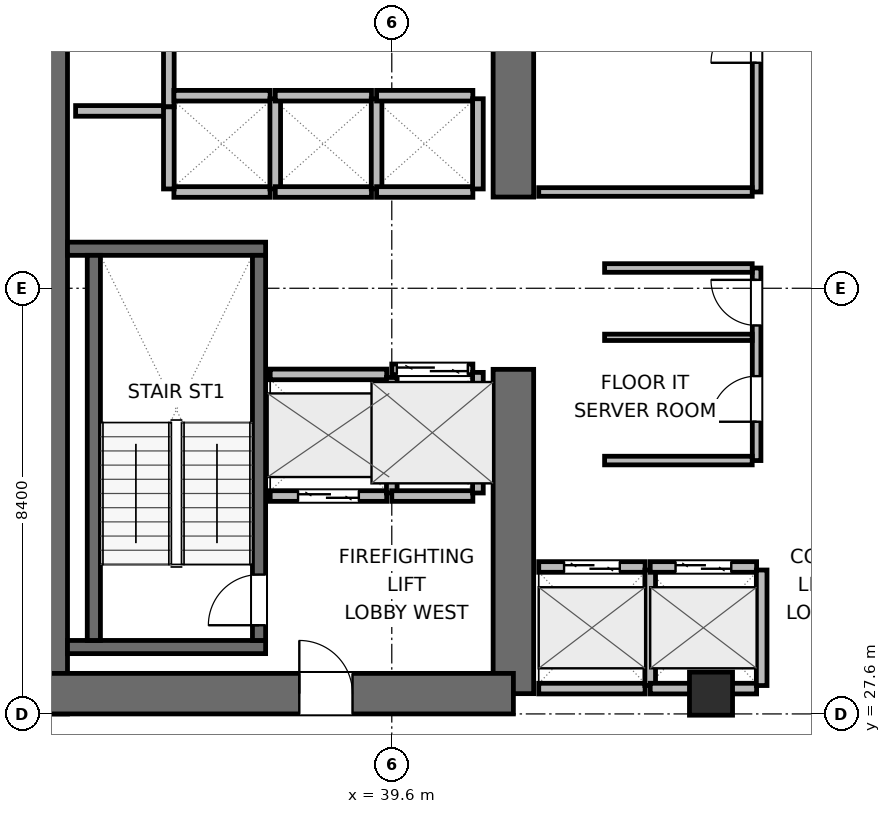
"""IFC4 building model, lengths in metres.
Left out: names, types, materials, properties, quantities, classifications, styles, units other than length and angle.
Written with IfcOpenShell. Run it as: python <this file> out.ifc"""

import sys

from ifc_helpers import new_model, si_unit, direction, frame, frame_2d, origin, origin_2d, place, context, subcontext, project, spatial, rectangle, extrude, element, fill, save


model = new_model("IFC4")
c1 = context("Model", 3, precision=1e-05, world=origin(), true_north=direction((0.0, 1.0)))
c2 = subcontext(c1, "Body", "Model", "MODEL_VIEW")
j1 = project(units=[si_unit("LENGTHUNIT", "METRE"), si_unit("PLANEANGLEUNIT", "RADIAN")], contexts=[c1])
p1 = place(None, origin())
s1 = spatial("IfcSite", under=j1, at=p1, CompositionType="ELEMENT")
p2 = place(p1, origin())
s2 = spatial("IfcBuilding", under=s1, at=p2, CompositionType="ELEMENT")
p3 = place(p2, frame((0.0, 0.0, 109.2)))
s3 = spatial("IfcBuildingStorey", under=s2, at=p3, CompositionType="ELEMENT", Elevation=109.2)
p4 = place(p3, frame((32.8, 27.6, 0.0), z_axis=(0.0, 0.0, 1.0), x_axis=(0.0, 1.0, 0.0)))
e1 = element("IfcWall", 1, at=p4, inside=s3, PredefinedType="SHEAR", context=c2, shape_type="SweptSolid", body=[
    extrude(rectangle(XDim=16.8, YDim=0.8, at=frame_2d((8.4, 0.0))), origin(), (0.0, 0.0, 1.0), 3.9),
])
p5 = place(p3, frame((42.0, 28.0, 0.0), z_axis=(0.0, 0.0, 1.0), x_axis=(0.0, 1.0, 0.0)))
e2 = element("IfcWall", 2, at=p5, inside=s3, PredefinedType="SHEAR", context=c2, shape_type="SweptSolid", body=[
    extrude(rectangle(XDim=6.4, YDim=0.8, at=frame_2d((3.2, 0.0))), origin(), (0.0, 0.0, 1.0), 3.9),
])
p6 = place(p3, frame((42.0, 37.8, 0.0), z_axis=(0.0, 0.0, 1.0), x_axis=(0.0, 1.0, 0.0)))
e3 = element("IfcWall", 3, at=p6, inside=s3, PredefinedType="SHEAR", context=c2, shape_type="SweptSolid", body=[
    extrude(rectangle(XDim=6.2, YDim=0.8, at=frame_2d((3.1, 0.0))), origin(), (0.0, 0.0, 1.0), 3.9),
])
p7 = place(p3, frame((32.8, 28.0, 0.0), z_axis=(0.0, 0.0, 1.0), x_axis=(1.0, 0.0, 0.0)))
e4 = element("IfcWall", 4, at=p7, inside=s3, PredefinedType="SHEAR", context=c2, shape_type="SweptSolid", body=[
    extrude(rectangle(XDim=9.2, YDim=0.8, at=frame_2d((4.6, 0.0))), origin(), (0.0, 0.0, 1.0), 3.9),
])
p8 = place(p7, frame((4.975, 0.0, 0.0)))
e5 = element("IfcOpeningElement", 5, at=p8, cuts=e4, PredefinedType="OPENING", context=c2, shape_type="SweptSolid", body=[
    extrude(rectangle(XDim=1.05, YDim=2.04, at=frame_2d((0.525, 1.02))), frame((0.0, 0.41, 0.0), z_axis=(0.0, -1.0, 0.0), x_axis=(1.0, 0.0, 0.0)), (0.0, 0.0, 1.0), 0.82),
])
for number, where, z_axis, x_axis in (
    (6, (33.2, 28.92, 0.0), (0.0, 0.0, 1.0), (1.0, 0.0, 0.0)),
    (7, (33.2, 36.78, 0.0), (0.0, 0.0, 1.0), (1.0, 0.0, 0.0)),
):
    element("IfcWall", number, at=place(p3, frame(where, z_axis=z_axis, x_axis=x_axis)), inside=s3, PredefinedType="SHEAR", context=c2, shape_type="SweptSolid", body=[
        extrude(rectangle(XDim=3.91, YDim=0.26, at=frame_2d((1.955, 0.0))), origin(), (0.0, 0.0, 1.0), 3.9),
    ])
p9 = place(p3, frame((33.72, 29.05, 0.0), z_axis=(0.0, 0.0, 1.0), x_axis=(0.0, 1.0, 0.0)))
e8 = element("IfcWall", 8, at=p9, inside=s3, PredefinedType="SHEAR", context=c2, shape_type="SweptSolid", body=[
    extrude(rectangle(XDim=7.6, YDim=0.26, at=frame_2d((3.8, 0.0))), origin(), (0.0, 0.0, 1.0), 3.9),
])
p10 = place(p3, frame((36.98, 29.05, 0.0), z_axis=(0.0, 0.0, 1.0), x_axis=(0.0, 1.0, 0.0)))
e9 = element("IfcWall", 9, at=p10, inside=s3, PredefinedType="SHEAR", context=c2, shape_type="SweptSolid", body=[
    extrude(rectangle(XDim=7.6, YDim=0.26, at=frame_2d((3.8, 0.0))), origin(), (0.0, 0.0, 1.0), 3.9),
])
p11 = place(p10, frame((0.3, 0.0, 0.0)))
e10 = element("IfcOpeningElement", 10, at=p11, cuts=e9, PredefinedType="OPENING", context=c2, shape_type="SweptSolid", body=[
    extrude(rectangle(XDim=1.0, YDim=2.04, at=frame_2d((0.5, 1.02))), frame((0.0, 0.14, 0.0), z_axis=(0.0, -1.0, 0.0), x_axis=(1.0, 0.0, 0.0)), (0.0, 0.0, 1.0), 0.28),
])
p12 = place(p3, frame((45.9, 28.0, 0.0), z_axis=(0.0, 0.0, 1.0), x_axis=(1.0, 0.0, 0.0)))
e11 = element("IfcColumn", 11, at=p12, inside=s3, PredefinedType="COLUMN", context=c2, shape_type="SweptSolid", body=[
    extrude(rectangle(XDim=0.85, YDim=0.85, at=origin_2d()), origin(), (0.0, 0.0, 1.0), 3.9),
])
p13 = place(p3, frame((33.36, 39.5, 0.0), z_axis=(0.0, 0.0, 1.0), x_axis=(1.0, 0.0, 0.0)))
e12 = element("IfcWall", 12, at=p13, inside=s3, PredefinedType="PARTITIONING", context=c2, shape_type="SweptSolid", body=[
    extrude(rectangle(XDim=1.86, YDim=0.21, at=frame_2d((0.93, 0.0))), origin(), (0.0, 0.0, 1.0), 3.64),
])
p14 = place(p3, frame((35.2, 39.58, 0.0), z_axis=(0.0, 0.0, 1.0), x_axis=(0.0, 1.0, 0.0)))
e13 = element("IfcWall", 13, at=p14, inside=s3, PredefinedType="PARTITIONING", context=c2, shape_type="SweptSolid", body=[
    extrude(rectangle(XDim=1.32, YDim=0.21, at=frame_2d((0.66, 0.0))), origin(), (0.0, 0.0, 1.0), 3.64),
])
p15 = place(p3, frame((37.2, 31.9, 0.0), z_axis=(0.0, 0.0, 1.0), x_axis=(1.0, 0.0, 0.0)))
e14 = element("IfcWall", 14, at=p15, inside=s3, PredefinedType="PARTITIONING", context=c2, shape_type="SweptSolid", body=[
    extrude(rectangle(XDim=2.3, YDim=0.21, at=frame_2d((1.15, 0.0))), origin(), (0.0, 0.0, 1.0), 3.64),
])
p16 = place(p15, frame((0.55, 0.0, 0.0)))
e15 = element("IfcOpeningElement", 15, at=p16, cuts=e14, PredefinedType="OPENING", context=c2, shape_type="SweptSolid", body=[
    extrude(rectangle(XDim=1.2, YDim=2.04, at=frame_2d((0.6, 1.02))), frame((0.0, 0.115, 0.0), z_axis=(0.0, -1.0, 0.0), x_axis=(1.0, 0.0, 0.0)), (0.0, 0.0, 1.0), 0.23),
])
p17 = place(p3, frame((37.2, 34.3, 0.0), z_axis=(0.0, 0.0, 1.0), x_axis=(1.0, 0.0, 0.0)))
e16 = element("IfcWall", 16, at=p17, inside=s3, PredefinedType="PARTITIONING", context=c2, shape_type="SweptSolid", body=[
    extrude(rectangle(XDim=2.3, YDim=0.21, at=frame_2d((1.15, 0.0))), origin(), (0.0, 0.0, 1.0), 3.64),
])
p18 = place(p3, frame((39.6, 31.96, 0.0), z_axis=(0.0, 0.0, 1.0), x_axis=(0.0, 1.0, 0.0)))
e17 = element("IfcWall", 17, at=p18, inside=s3, PredefinedType="PARTITIONING", context=c2, shape_type="SweptSolid", body=[
    extrude(rectangle(XDim=2.28, YDim=0.21, at=frame_2d((1.14, 0.0))), origin(), (0.0, 0.0, 1.0), 3.64),
])
p19 = place(p3, frame((39.6, 34.4, 0.0), z_axis=(0.0, 0.0, 1.0), x_axis=(1.0, 0.0, 0.0)))
e18 = element("IfcWall", 18, at=p19, inside=s3, PredefinedType="PARTITIONING", context=c2, shape_type="SweptSolid", body=[
    extrude(rectangle(XDim=1.6, YDim=0.21, at=frame_2d((0.8, 0.0))), origin(), (0.0, 0.0, 1.0), 3.64),
])
p20 = place(p19, frame((0.1, 0.0, 0.0)))
e19 = element("IfcOpeningElement", 19, at=p20, cuts=e18, PredefinedType="OPENING", context=c2, shape_type="SweptSolid", body=[
    extrude(rectangle(XDim=1.4, YDim=2.06, at=frame_2d((0.7, 1.03))), frame((0.0, 0.115, 0.0), z_axis=(0.0, -1.0, 0.0), x_axis=(1.0, 0.0, 0.0)), (0.0, 0.0, 1.0), 0.23),
])
p21 = place(p3, frame((39.6, 31.9, 0.0), z_axis=(0.0, 0.0, 1.0), x_axis=(1.0, 0.0, 0.0)))
e20 = element("IfcWall", 20, at=p21, inside=s3, PredefinedType="PARTITIONING", context=c2, shape_type="SweptSolid", body=[
    extrude(rectangle(XDim=1.6, YDim=0.21, at=frame_2d((0.8, 0.0))), origin(), (0.0, 0.0, 1.0), 3.64),
])
p22 = place(p3, frame((41.3, 31.96, 0.0), z_axis=(0.0, 0.0, 1.0), x_axis=(0.0, 1.0, 0.0)))
e21 = element("IfcWall", 21, at=p22, inside=s3, PredefinedType="PARTITIONING", context=c2, shape_type="SweptSolid", body=[
    extrude(rectangle(XDim=2.38, YDim=0.21, at=frame_2d((1.19, 0.0))), origin(), (0.0, 0.0, 1.0), 3.64),
])
p23 = place(p3, frame((42.5, 30.5, 0.0), z_axis=(0.0, 0.0, 1.0), x_axis=(1.0, 0.0, 0.0)))
e22 = element("IfcWall", 22, at=p23, inside=s3, PredefinedType="PARTITIONING", context=c2, shape_type="SweptSolid", body=[
    extrude(rectangle(XDim=2.1, YDim=0.21, at=frame_2d((1.05, 0.0))), origin(), (0.0, 0.0, 1.0), 3.64),
])
p24 = place(p23, frame((0.5, 0.0, 0.0)))
e23 = element("IfcOpeningElement", 23, at=p24, cuts=e22, PredefinedType="OPENING", context=c2, shape_type="SweptSolid", body=[
    extrude(rectangle(XDim=1.1, YDim=2.04, at=frame_2d((0.55, 1.02))), frame((0.0, 0.115, 0.0), z_axis=(0.0, -1.0, 0.0), x_axis=(1.0, 0.0, 0.0)), (0.0, 0.0, 1.0), 0.23),
])
p25 = place(p3, frame((42.5, 28.1, 0.0), z_axis=(0.0, 0.0, 1.0), x_axis=(1.0, 0.0, 0.0)))
e24 = element("IfcWall", 24, at=p25, inside=s3, PredefinedType="PARTITIONING", context=c2, shape_type="SweptSolid", body=[
    extrude(rectangle(XDim=2.1, YDim=0.21, at=frame_2d((1.05, 0.0))), origin(), (0.0, 0.0, 1.0), 2.525),
])
p26 = place(p3, frame((44.7, 28.16, 0.0), z_axis=(0.0, 0.0, 1.0), x_axis=(0.0, 1.0, 0.0)))
e25 = element("IfcWall", 25, at=p26, inside=s3, PredefinedType="PARTITIONING", context=c2, shape_type="SweptSolid", body=[
    extrude(rectangle(XDim=2.28, YDim=0.21, at=frame_2d((1.14, 0.0))), origin(), (0.0, 0.0, 1.0), 3.64),
])
p27 = place(p3, frame((44.7, 30.5, 0.0), z_axis=(0.0, 0.0, 1.0), x_axis=(1.0, 0.0, 0.0)))
e26 = element("IfcWall", 26, at=p27, inside=s3, PredefinedType="PARTITIONING", context=c2, shape_type="SweptSolid", body=[
    extrude(rectangle(XDim=2.1, YDim=0.21, at=frame_2d((1.05, 0.0))), origin(), (0.0, 0.0, 1.0), 3.64),
])
p28 = place(p27, frame((0.5, 0.0, 0.0)))
e27 = element("IfcOpeningElement", 27, at=p28, cuts=e26, PredefinedType="OPENING", context=c2, shape_type="SweptSolid", body=[
    extrude(rectangle(XDim=1.1, YDim=2.04, at=frame_2d((0.55, 1.02))), frame((0.0, 0.115, 0.0), z_axis=(0.0, -1.0, 0.0), x_axis=(1.0, 0.0, 0.0)), (0.0, 0.0, 1.0), 0.23),
])
p29 = place(p3, frame((44.7, 28.1, 0.0), z_axis=(0.0, 0.0, 1.0), x_axis=(1.0, 0.0, 0.0)))
e28 = element("IfcWall", 28, at=p29, inside=s3, PredefinedType="PARTITIONING", context=c2, shape_type="SweptSolid", body=[
    extrude(rectangle(XDim=2.1, YDim=0.21, at=frame_2d((1.05, 0.0))), origin(), (0.0, 0.0, 1.0), 2.525),
])
p30 = place(p3, frame((46.9, 28.16, 0.0), z_axis=(0.0, 0.0, 1.0), x_axis=(0.0, 1.0, 0.0)))
e29 = element("IfcWall", 29, at=p30, inside=s3, PredefinedType="PARTITIONING", context=c2, shape_type="SweptSolid", body=[
    extrude(rectangle(XDim=2.28, YDim=0.21, at=frame_2d((1.14, 0.0))), origin(), (0.0, 0.0, 1.0), 3.64),
])
for number, where, z_axis, x_axis in (
    (30, (35.3, 37.9, 0.0), (0.0, 0.0, 1.0), (1.0, 0.0, 0.0)),
    (31, (35.3, 39.8, 0.0), (0.0, 0.0, 1.0), (1.0, 0.0, 0.0)),
):
    element("IfcWall", number, at=place(p3, frame(where, z_axis=z_axis, x_axis=x_axis)), inside=s3, PredefinedType="PARTITIONING", context=c2, shape_type="SweptSolid", body=[
        extrude(rectangle(XDim=1.9, YDim=0.21, at=frame_2d((0.95, 0.0))), origin(), (0.0, 0.0, 1.0), 3.64),
    ])
p31 = place(p3, frame((35.2, 37.96, 0.0), z_axis=(0.0, 0.0, 1.0), x_axis=(0.0, 1.0, 0.0)))
e32 = element("IfcWall", 32, at=p31, inside=s3, PredefinedType="PARTITIONING", context=c2, shape_type="SweptSolid", body=[
    extrude(rectangle(XDim=1.62, YDim=0.21, at=frame_2d((0.81, 0.0))), origin(), (0.0, 0.0, 1.0), 3.64),
])
p32 = place(p3, frame((37.3, 37.96, 0.0), z_axis=(0.0, 0.0, 1.0), x_axis=(0.0, 1.0, 0.0)))
e33 = element("IfcWall", 33, at=p32, inside=s3, PredefinedType="PARTITIONING", context=c2, shape_type="SweptSolid", body=[
    extrude(rectangle(XDim=1.78, YDim=0.21, at=frame_2d((0.89, 0.0))), origin(), (0.0, 0.0, 1.0), 3.64),
])
for number, where, z_axis, x_axis in (
    (34, (37.3, 37.9, 0.0), (0.0, 0.0, 1.0), (1.0, 0.0, 0.0)),
    (35, (37.3, 39.8, 0.0), (0.0, 0.0, 1.0), (1.0, 0.0, 0.0)),
):
    element("IfcWall", number, at=place(p3, frame(where, z_axis=z_axis, x_axis=x_axis)), inside=s3, PredefinedType="PARTITIONING", context=c2, shape_type="SweptSolid", body=[
        extrude(rectangle(XDim=1.9, YDim=0.21, at=frame_2d((0.95, 0.0))), origin(), (0.0, 0.0, 1.0), 3.64),
    ])
p33 = place(p3, frame((39.3, 37.96, 0.0), z_axis=(0.0, 0.0, 1.0), x_axis=(0.0, 1.0, 0.0)))
e36 = element("IfcWall", 36, at=p33, inside=s3, PredefinedType="PARTITIONING", context=c2, shape_type="SweptSolid", body=[
    extrude(rectangle(XDim=1.78, YDim=0.21, at=frame_2d((0.89, 0.0))), origin(), (0.0, 0.0, 1.0), 3.64),
])
for number, where, z_axis, x_axis in (
    (37, (39.3, 37.9, 0.0), (0.0, 0.0, 1.0), (1.0, 0.0, 0.0)),
    (38, (39.3, 39.8, 0.0), (0.0, 0.0, 1.0), (1.0, 0.0, 0.0)),
):
    element("IfcWall", number, at=place(p3, frame(where, z_axis=z_axis, x_axis=x_axis)), inside=s3, PredefinedType="PARTITIONING", context=c2, shape_type="SweptSolid", body=[
        extrude(rectangle(XDim=1.9, YDim=0.21, at=frame_2d((0.95, 0.0))), origin(), (0.0, 0.0, 1.0), 3.64),
    ])
p34 = place(p3, frame((41.3, 37.96, 0.0), z_axis=(0.0, 0.0, 1.0), x_axis=(0.0, 1.0, 0.0)))
e39 = element("IfcWall", 39, at=p34, inside=s3, PredefinedType="PARTITIONING", context=c2, shape_type="SweptSolid", body=[
    extrude(rectangle(XDim=1.78, YDim=0.21, at=frame_2d((0.89, 0.0))), origin(), (0.0, 0.0, 1.0), 3.64),
])
p35 = place(p3, frame((46.8, 32.6, 0.0), z_axis=(0.0, 0.0, 1.0), x_axis=(0.0, 1.0, 0.0)))
e40 = element("IfcWall", 40, at=p35, inside=s3, PredefinedType="PARTITIONING", context=c2, shape_type="SweptSolid", body=[
    extrude(rectangle(XDim=3.8, YDim=0.17, at=frame_2d((1.9, 0.0))), origin(), (0.0, 0.0, 1.0), 3.64),
])
p36 = place(p35, frame((0.766, 0.0, 0.0)))
e41 = element("IfcOpeningElement", 41, at=p36, cuts=e40, PredefinedType="OPENING", context=c2, shape_type="SweptSolid", body=[
    extrude(rectangle(XDim=0.9, YDim=2.02, at=frame_2d((0.45, 1.01))), frame((0.0, 0.095, 0.0), z_axis=(0.0, -1.0, 0.0), x_axis=(1.0, 0.0, 0.0)), (0.0, 0.0, 1.0), 0.19),
])
p37 = place(p35, frame((2.666, 0.0, 0.0)))
e42 = element("IfcOpeningElement", 42, at=p37, cuts=e40, PredefinedType="OPENING", context=c2, shape_type="SweptSolid", body=[
    extrude(rectangle(XDim=0.9, YDim=2.02, at=frame_2d((0.45, 1.01))), frame((0.0, 0.095, 0.0), z_axis=(0.0, -1.0, 0.0), x_axis=(1.0, 0.0, 0.0)), (0.0, 0.0, 1.0), 0.19),
])
for number, where, z_axis, x_axis in (
    (43, (43.8, 32.6, 0.0), (0.0, 0.0, 1.0), (1.0, 0.0, 0.0)),
    (44, (43.8, 36.4, 0.0), (0.0, 0.0, 1.0), (1.0, 0.0, 0.0)),
):
    element("IfcWall", number, at=place(p3, frame(where, z_axis=z_axis, x_axis=x_axis)), inside=s3, PredefinedType="PARTITIONING", context=c2, shape_type="SweptSolid", body=[
        extrude(rectangle(XDim=2.913, YDim=0.17, at=frame_2d((1.457, 0.0))), origin(), (0.0, 0.0, 1.0), 3.64),
    ])
p38 = place(p3, frame((43.8, 35.032, 0.0), z_axis=(0.0, 0.0, 1.0), x_axis=(1.0, 0.0, 0.0)))
e45 = element("IfcWall", 45, at=p38, inside=s3, PredefinedType="PARTITIONING", context=c2, shape_type="SweptSolid", body=[
    extrude(rectangle(XDim=2.913, YDim=0.125, at=frame_2d((1.457, 0.0))), origin(), (0.0, 0.0, 1.0), 3.64),
])
p39 = place(p3, frame((46.8, 37.9, 0.0), z_axis=(0.0, 0.0, 1.0), x_axis=(0.0, 1.0, 0.0)))
e46 = element("IfcWall", 46, at=p39, inside=s3, PredefinedType="PARTITIONING", context=c2, shape_type="SweptSolid", body=[
    extrude(rectangle(XDim=6.0, YDim=0.17, at=frame_2d((3.0, 0.0))), origin(), (0.0, 0.0, 1.0), 3.64),
])
p40 = place(p39, frame((2.55, 0.0, 0.0)))
e47 = element("IfcOpeningElement", 47, at=p40, cuts=e46, PredefinedType="OPENING", context=c2, shape_type="SweptSolid", body=[
    extrude(rectangle(XDim=0.9, YDim=2.02, at=frame_2d((0.45, 1.01))), frame((0.0, 0.095, 0.0), z_axis=(0.0, -1.0, 0.0), x_axis=(1.0, 0.0, 0.0)), (0.0, 0.0, 1.0), 0.19),
])
p41 = place(p3, frame((42.5, 37.9, 0.0), z_axis=(0.0, 0.0, 1.0), x_axis=(1.0, 0.0, 0.0)))
e48 = element("IfcWall", 48, at=p41, inside=s3, PredefinedType="PARTITIONING", context=c2, shape_type="SweptSolid", body=[
    extrude(rectangle(XDim=4.213, YDim=0.17, at=frame_2d((2.106, 0.0))), origin(), (0.0, 0.0, 1.0), 3.64),
])
p42 = place(p11, origin())
e49 = element("IfcDoor", 49, at=p42, inside=s3, OperationType="SINGLE_SWING_LEFT", PredefinedType="DOOR", context=c2, shape_type="SweptSolid", body=[
    extrude(rectangle(XDim=1.0, YDim=2.04, at=frame_2d((0.5, 1.02))), frame((0.0, 0.025, 0.0), z_axis=(0.0, -1.0, 0.0), x_axis=(1.0, 0.0, 0.0)), (0.0, 0.0, 1.0), 0.05),
])
fill(e10, e49)
p43 = place(p16, origin())
e50 = element("IfcDoor", 50, at=p43, inside=s3, OperationType="DOUBLE_DOOR_SLIDING", PredefinedType="DOOR", context=c2, shape_type="SweptSolid", body=[
    extrude(rectangle(XDim=1.2, YDim=2.04, at=frame_2d((0.6, 1.02))), frame((0.0, 0.025, 0.0), z_axis=(0.0, -1.0, 0.0), x_axis=(1.0, 0.0, 0.0)), (0.0, 0.0, 1.0), 0.05),
])
fill(e15, e50)
p44 = place(p20, origin())
e51 = element("IfcDoor", 51, at=p44, inside=s3, OperationType="DOUBLE_DOOR_SLIDING", PredefinedType="DOOR", context=c2, shape_type="SweptSolid", body=[
    extrude(rectangle(XDim=1.4, YDim=2.06, at=frame_2d((0.7, 1.03))), frame((0.0, 0.025, 0.0), z_axis=(0.0, -1.0, 0.0), x_axis=(1.0, 0.0, 0.0)), (0.0, 0.0, 1.0), 0.05),
])
fill(e19, e51)
p45 = place(p24, origin())
e52 = element("IfcDoor", 52, at=p45, inside=s3, OperationType="DOUBLE_DOOR_SLIDING", PredefinedType="DOOR", context=c2, shape_type="SweptSolid", body=[
    extrude(rectangle(XDim=1.1, YDim=2.04, at=frame_2d((0.55, 1.02))), frame((0.0, 0.025, 0.0), z_axis=(0.0, -1.0, 0.0), x_axis=(1.0, 0.0, 0.0)), (0.0, 0.0, 1.0), 0.05),
])
fill(e23, e52)
p46 = place(p28, origin())
e53 = element("IfcDoor", 53, at=p46, inside=s3, OperationType="DOUBLE_DOOR_SLIDING", PredefinedType="DOOR", context=c2, shape_type="SweptSolid", body=[
    extrude(rectangle(XDim=1.1, YDim=2.04, at=frame_2d((0.55, 1.02))), frame((0.0, 0.025, 0.0), z_axis=(0.0, -1.0, 0.0), x_axis=(1.0, 0.0, 0.0)), (0.0, 0.0, 1.0), 0.05),
])
fill(e27, e53)
p47 = place(p8, origin())
e54 = element("IfcDoor", 54, at=p47, inside=s3, OperationType="SINGLE_SWING_LEFT", PredefinedType="DOOR", context=c2, shape_type="SweptSolid", body=[
    extrude(rectangle(XDim=1.05, YDim=2.04, at=frame_2d((0.525, 1.02))), frame((0.0, 0.025, 0.0), z_axis=(0.0, -1.0, 0.0), x_axis=(1.0, 0.0, 0.0)), (0.0, 0.0, 1.0), 0.05),
])
fill(e5, e54)
p48 = place(p36, origin())
e55 = element("IfcDoor", 55, at=p48, inside=s3, OperationType="SINGLE_SWING_LEFT", PredefinedType="DOOR", context=c2, shape_type="SweptSolid", body=[
    extrude(rectangle(XDim=0.9, YDim=2.02, at=frame_2d((0.45, 1.01))), frame((0.0, 0.025, 0.0), z_axis=(0.0, -1.0, 0.0), x_axis=(1.0, 0.0, 0.0)), (0.0, 0.0, 1.0), 0.05),
])
fill(e41, e55)
p49 = place(p37, origin())
e56 = element("IfcDoor", 56, at=p49, inside=s3, OperationType="SINGLE_SWING_RIGHT", PredefinedType="DOOR", context=c2, shape_type="SweptSolid", body=[
    extrude(rectangle(XDim=0.9, YDim=2.02, at=frame_2d((0.45, 1.01))), frame((0.0, 0.025, 0.0), z_axis=(0.0, -1.0, 0.0), x_axis=(1.0, 0.0, 0.0)), (0.0, 0.0, 1.0), 0.05),
])
fill(e42, e56)
p50 = place(p40, origin())
e57 = element("IfcDoor", 57, at=p50, inside=s3, OperationType="SINGLE_SWING_LEFT", PredefinedType="DOOR", context=c2, shape_type="SweptSolid", body=[
    extrude(rectangle(XDim=0.9, YDim=2.02, at=frame_2d((0.45, 1.01))), frame((0.0, 0.025, 0.0), z_axis=(0.0, -1.0, 0.0), x_axis=(1.0, 0.0, 0.0)), (0.0, 0.0, 1.0), 0.05),
])
fill(e47, e57)
save(model, sys.argv[1])
